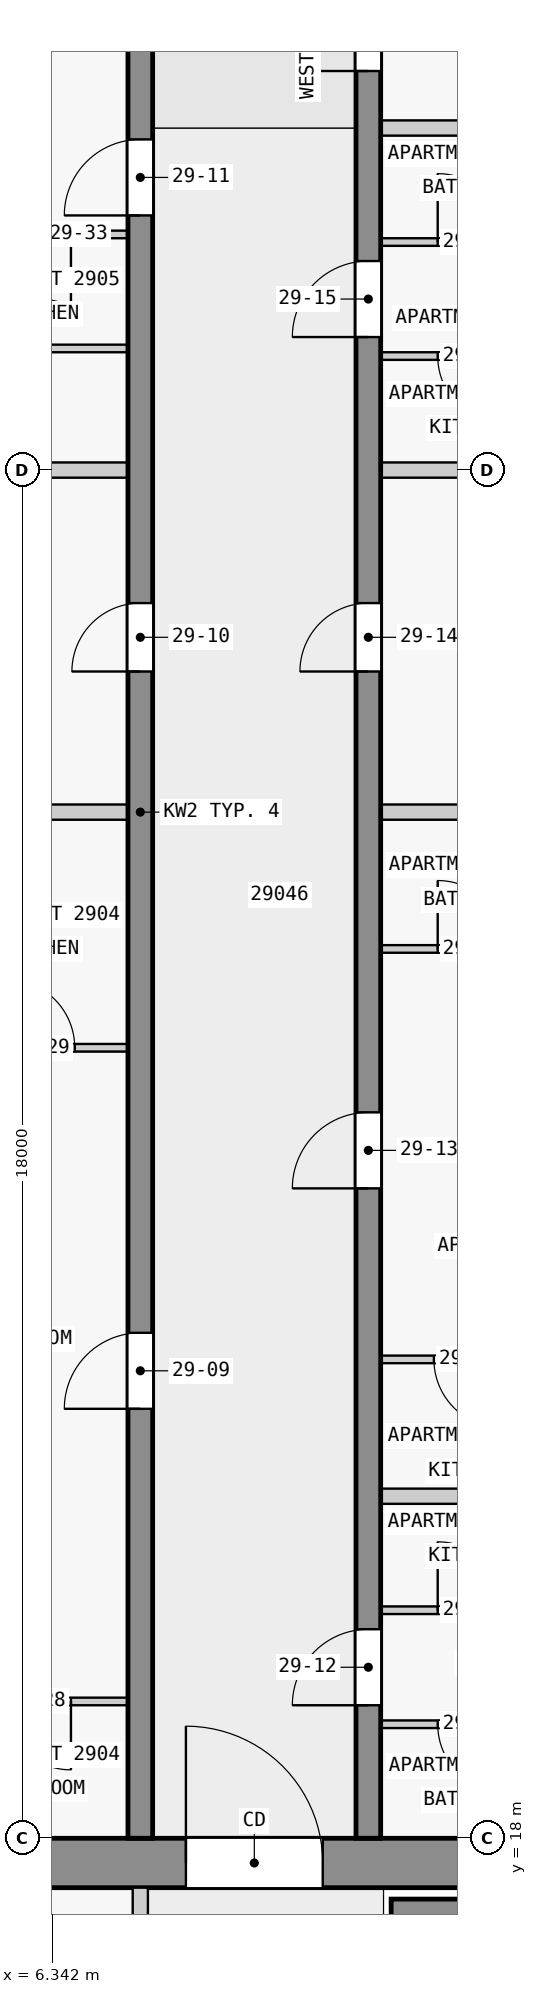
"""IFC4 building model, lengths in metres.
Left out: names, types, materials, properties, quantities, classifications, styles, units other than length and angle.
Written with IfcOpenShell. Run it as: python <this file> out.ifc"""

import sys

from ifc_helpers import new_model, si_unit, direction, frame, frame_2d, origin, place, context, subcontext, project, spatial, rectangle, extrude, element, fill, save


model = new_model("IFC4")
c1 = context("Model", 3, precision=1e-05, world=origin(), true_north=direction((0.0, 1.0)))
c2 = subcontext(c1, "Body", "Model", "MODEL_VIEW")
j1 = project(units=[si_unit("LENGTHUNIT", "METRE"), si_unit("PLANEANGLEUNIT", "RADIAN")], contexts=[c1])
p1 = place(None, origin())
s1 = spatial("IfcSite", under=j1, at=p1, CompositionType="ELEMENT")
p2 = place(p1, origin())
s2 = spatial("IfcBuilding", under=s1, at=p2, CompositionType="ELEMENT")
p3 = place(p2, frame((0.0, 0.0, 113.3)))
s3 = spatial("IfcBuildingStorey", under=s2, at=p3, CompositionType="ELEMENT", Elevation=113.3)
p4 = place(p3, frame((1.65, 17.675, 0.0), z_axis=(0.0, 0.0, 1.0), x_axis=(1.0, 0.0, 0.0)))
e1 = element("IfcWall", 1, at=p4, inside=s3, PredefinedType="SHEAR", context=c2, shape_type="SweptSolid", body=[
    extrude(rectangle(XDim=20.85, YDim=0.65, at=frame_2d((10.425, 0.0))), origin(), (0.0, 0.0, 1.0), 3.25),
])
p5 = place(p4, frame((6.45, 0.0, 0.0)))
e2 = element("IfcOpeningElement", 2, at=p5, cuts=e1, PredefinedType="OPENING", context=c2, shape_type="SweptSolid", body=[
    extrude(rectangle(XDim=1.8, YDim=2.1, at=frame_2d((0.9, 1.05))), frame((0.0, 0.335, 0.0), z_axis=(0.0, -1.0, 0.0), x_axis=(1.0, 0.0, 0.0)), (0.0, 0.0, 1.0), 0.67),
])
p6 = place(p3, frame((10.8, 17.05, 0.0), z_axis=(0.0, 0.0, 1.0), x_axis=(1.0, 0.0, 0.0)))
e3 = element("IfcWall", 3, at=p6, inside=s3, PredefinedType="SHEAR", context=c2, shape_type="SweptSolid", body=[
    extrude(rectangle(XDim=7.8, YDim=0.3, at=frame_2d((3.9, 0.0))), origin(), (0.0, 0.0, 1.0), 3.25),
])
p7 = place(p3, frame((7.5, 18.0, 0.0), z_axis=(0.0, 0.0, 1.0), x_axis=(0.0, 1.0, 0.0)))
e4 = element("IfcWall", 4, at=p7, inside=s3, PredefinedType="SHEAR", context=c2, shape_type="SweptSolid", body=[
    extrude(rectangle(XDim=27.0, YDim=0.325, at=frame_2d((13.5, 0.0))), origin(), (0.0, 0.0, 1.0), 3.25),
])
p8 = place(p7, frame((5.65, 0.0, 0.0)))
e5 = element("IfcOpeningElement", 5, at=p8, cuts=e4, PredefinedType="OPENING", context=c2, shape_type="SweptSolid", body=[
    extrude(rectangle(XDim=1.0, YDim=2.1, at=frame_2d((0.5, 1.05))), frame((0.0, 0.172, 0.0), z_axis=(0.0, -1.0, 0.0), x_axis=(1.0, 0.0, 0.0)), (0.0, 0.0, 1.0), 0.345),
])
p9 = place(p7, frame((15.35, 0.0, 0.0)))
e6 = element("IfcOpeningElement", 6, at=p9, cuts=e4, PredefinedType="OPENING", context=c2, shape_type="SweptSolid", body=[
    extrude(rectangle(XDim=0.9, YDim=2.1, at=frame_2d((0.45, 1.05))), frame((0.0, 0.172, 0.0), z_axis=(0.0, -1.0, 0.0), x_axis=(1.0, 0.0, 0.0)), (0.0, 0.0, 1.0), 0.345),
])
p10 = place(p7, frame((21.35, 0.0, 0.0)))
e7 = element("IfcOpeningElement", 7, at=p10, cuts=e4, PredefinedType="OPENING", context=c2, shape_type="SweptSolid", body=[
    extrude(rectangle(XDim=1.0, YDim=2.1, at=frame_2d((0.5, 1.05))), frame((0.0, 0.172, 0.0), z_axis=(0.0, -1.0, 0.0), x_axis=(1.0, 0.0, 0.0)), (0.0, 0.0, 1.0), 0.345),
])
p11 = place(p3, frame((10.5, 18.0, 0.0), z_axis=(0.0, 0.0, 1.0), x_axis=(0.0, 1.0, 0.0)))
e8 = element("IfcWall", 8, at=p11, inside=s3, PredefinedType="SHEAR", context=c2, shape_type="SweptSolid", body=[
    extrude(rectangle(XDim=27.0, YDim=0.325, at=frame_2d((13.5, 0.0))), origin(), (0.0, 0.0, 1.0), 3.25),
])
p12 = place(p11, frame((1.75, 0.0, 0.0)))
e9 = element("IfcOpeningElement", 9, at=p12, cuts=e8, PredefinedType="OPENING", context=c2, shape_type="SweptSolid", body=[
    extrude(rectangle(XDim=1.0, YDim=2.1, at=frame_2d((0.5, 1.05))), frame((0.0, 0.172, 0.0), z_axis=(0.0, -1.0, 0.0), x_axis=(1.0, 0.0, 0.0)), (0.0, 0.0, 1.0), 0.345),
])
p13 = place(p11, frame((8.55, 0.0, 0.0)))
e10 = element("IfcOpeningElement", 10, at=p13, cuts=e8, PredefinedType="OPENING", context=c2, shape_type="SweptSolid", body=[
    extrude(rectangle(XDim=1.0, YDim=2.1, at=frame_2d((0.5, 1.05))), frame((0.0, 0.172, 0.0), z_axis=(0.0, -1.0, 0.0), x_axis=(1.0, 0.0, 0.0)), (0.0, 0.0, 1.0), 0.345),
])
p14 = place(p11, frame((15.35, 0.0, 0.0)))
e11 = element("IfcOpeningElement", 11, at=p14, cuts=e8, PredefinedType="OPENING", context=c2, shape_type="SweptSolid", body=[
    extrude(rectangle(XDim=0.9, YDim=2.1, at=frame_2d((0.45, 1.05))), frame((0.0, 0.172, 0.0), z_axis=(0.0, -1.0, 0.0), x_axis=(1.0, 0.0, 0.0)), (0.0, 0.0, 1.0), 0.345),
])
p15 = place(p11, frame((19.75, 0.0, 0.0)))
e12 = element("IfcOpeningElement", 12, at=p15, cuts=e8, PredefinedType="OPENING", context=c2, shape_type="SweptSolid", body=[
    extrude(rectangle(XDim=1.0, YDim=2.1, at=frame_2d((0.5, 1.05))), frame((0.0, 0.172, 0.0), z_axis=(0.0, -1.0, 0.0), x_axis=(1.0, 0.0, 0.0)), (0.0, 0.0, 1.0), 0.345),
])
p16 = place(p11, frame((23.25, 0.0, 0.0)))
e13 = element("IfcOpeningElement", 13, at=p16, cuts=e8, PredefinedType="OPENING", context=c2, shape_type="SweptSolid", body=[
    extrude(rectangle(XDim=0.9, YDim=2.1, at=frame_2d((0.45, 1.05))), frame((0.0, 0.172, 0.0), z_axis=(0.0, -1.0, 0.0), x_axis=(1.0, 0.0, 0.0)), (0.0, 0.0, 1.0), 0.345),
])
p17 = place(p11, frame((25.45, 0.0, 0.0)))
e14 = element("IfcOpeningElement", 14, at=p17, cuts=e8, PredefinedType="OPENING", context=c2, shape_type="SweptSolid", body=[
    extrude(rectangle(XDim=1.0, YDim=2.1, at=frame_2d((0.5, 1.05))), frame((0.0, 0.172, 0.0), z_axis=(0.0, -1.0, 0.0), x_axis=(1.0, 0.0, 0.0)), (0.0, 0.0, 1.0), 0.345),
])
p18 = place(p3, frame((7.5, 10.1, 0.0), z_axis=(0.0, 0.0, 1.0), x_axis=(0.0, 1.0, 0.0)))
e15 = element("IfcWall", 15, at=p18, inside=s3, PredefinedType="PARTITIONING", context=c2, shape_type="SweptSolid", body=[
    extrude(rectangle(XDim=7.25, YDim=0.2, at=frame_2d((3.625, 0.0))), origin(), (0.0, 0.0, 1.0), 3.25),
])
p19 = place(p18, frame((1.5, 0.0, 0.0)))
e16 = element("IfcOpeningElement", 16, at=p19, cuts=e15, PredefinedType="OPENING", context=c2, shape_type="SweptSolid", body=[
    extrude(rectangle(XDim=0.9, YDim=2.1, at=frame_2d((0.45, 1.05))), frame((0.0, 0.11, 0.0), z_axis=(0.0, -1.0, 0.0), x_axis=(1.0, 0.0, 0.0)), (0.0, 0.0, 1.0), 0.22),
])
p20 = place(p18, frame((5.125, 0.0, 0.0)))
e17 = element("IfcOpeningElement", 17, at=p20, cuts=e15, PredefinedType="OPENING", context=c2, shape_type="SweptSolid", body=[
    extrude(rectangle(XDim=0.9, YDim=2.1, at=frame_2d((0.45, 1.05))), frame((0.0, 0.11, 0.0), z_axis=(0.0, -1.0, 0.0), x_axis=(1.0, 0.0, 0.0)), (0.0, 0.0, 1.0), 0.22),
])
p21 = place(p3, frame((13.062, 19.5, 0.0), z_axis=(0.0, 0.0, 1.0), x_axis=(-1.0, 0.0, 0.0)))
e18 = element("IfcWall", 18, at=p21, inside=s3, PredefinedType="PARTITIONING", context=c2, shape_type="SweptSolid", body=[
    extrude(rectangle(XDim=2.4, YDim=0.1, at=frame_2d((1.2, 0.0))), origin(), (0.0, 0.0, 1.0), 3.25),
])
p22 = place(p21, frame((0.75, 0.0, 0.0)))
e19 = element("IfcOpeningElement", 19, at=p22, cuts=e18, PredefinedType="OPENING", context=c2, shape_type="SweptSolid", body=[
    extrude(rectangle(XDim=0.9, YDim=2.1, at=frame_2d((0.45, 1.05))), frame((0.0, 0.06, 0.0), z_axis=(0.0, -1.0, 0.0), x_axis=(1.0, 0.0, 0.0)), (0.0, 0.0, 1.0), 0.12),
])
p23 = place(p3, frame((7.337, 19.8, 0.0), z_axis=(0.0, 0.0, 1.0), x_axis=(-1.0, 0.0, 0.0)))
e20 = element("IfcWall", 20, at=p23, inside=s3, PredefinedType="PARTITIONING", context=c2, shape_type="SweptSolid", body=[
    extrude(rectangle(XDim=2.35, YDim=0.1, at=frame_2d((1.175, 0.0))), origin(), (0.0, 0.0, 1.0), 3.25),
])
p24 = place(p23, frame((0.75, 0.0, 0.0)))
e21 = element("IfcOpeningElement", 21, at=p24, cuts=e20, PredefinedType="OPENING", context=c2, shape_type="SweptSolid", body=[
    extrude(rectangle(XDim=0.9, YDim=2.1, at=frame_2d((0.45, 1.05))), frame((0.0, 0.06, 0.0), z_axis=(0.0, -1.0, 0.0), x_axis=(1.0, 0.0, 0.0)), (0.0, 0.0, 1.0), 0.12),
])
p25 = place(p3, frame((10.663, 21.0, 0.0), z_axis=(0.0, 0.0, 1.0), x_axis=(1.0, 0.0, 0.0)))
e22 = element("IfcWall", 22, at=p25, inside=s3, PredefinedType="PARTITIONING", context=c2, shape_type="SweptSolid", body=[
    extrude(rectangle(XDim=2.35, YDim=0.1, at=frame_2d((1.175, 0.0))), origin(), (0.0, 0.0, 1.0), 3.25),
])
p26 = place(p25, frame((0.75, 0.0, 0.0)))
e23 = element("IfcOpeningElement", 23, at=p26, cuts=e22, PredefinedType="OPENING", context=c2, shape_type="SweptSolid", body=[
    extrude(rectangle(XDim=0.9, YDim=2.1, at=frame_2d((0.45, 1.05))), frame((0.0, 0.06, 0.0), z_axis=(0.0, -1.0, 0.0), x_axis=(1.0, 0.0, 0.0)), (0.0, 0.0, 1.0), 0.12),
])
p27 = place(p3, frame((12.962, 22.5, 0.0), z_axis=(0.0, 0.0, 1.0), x_axis=(-1.0, 0.0, 0.0)))
e24 = element("IfcWall", 24, at=p27, inside=s3, PredefinedType="PARTITIONING", context=c2, shape_type="SweptSolid", body=[
    extrude(rectangle(XDim=2.3, YDim=0.2, at=frame_2d((1.15, 0.0))), origin(), (0.0, 0.0, 1.0), 3.25),
])
p28 = place(p3, frame((13.012, 24.3, 0.0), z_axis=(0.0, 0.0, 1.0), x_axis=(-1.0, 0.0, 0.0)))
e25 = element("IfcWall", 25, at=p28, inside=s3, PredefinedType="PARTITIONING", context=c2, shape_type="SweptSolid", body=[
    extrude(rectangle(XDim=2.35, YDim=0.1, at=frame_2d((1.175, 0.0))), origin(), (0.0, 0.0, 1.0), 3.25),
])
p29 = place(p28, frame((0.75, 0.0, 0.0)))
e26 = element("IfcOpeningElement", 26, at=p29, cuts=e25, PredefinedType="OPENING", context=c2, shape_type="SweptSolid", body=[
    extrude(rectangle(XDim=0.9, YDim=2.1, at=frame_2d((0.45, 1.05))), frame((0.0, 0.06, 0.0), z_axis=(0.0, -1.0, 0.0), x_axis=(1.0, 0.0, 0.0)), (0.0, 0.0, 1.0), 0.12),
])
p30 = place(p3, frame((4.988, 28.4, 0.0), z_axis=(0.0, 0.0, 1.0), x_axis=(1.0, 0.0, 0.0)))
e27 = element("IfcWall", 27, at=p30, inside=s3, PredefinedType="PARTITIONING", context=c2, shape_type="SweptSolid", body=[
    extrude(rectangle(XDim=2.35, YDim=0.1, at=frame_2d((1.175, 0.0))), origin(), (0.0, 0.0, 1.0), 3.25),
])
p31 = place(p30, frame((0.75, 0.0, 0.0)))
e28 = element("IfcOpeningElement", 28, at=p31, cuts=e27, PredefinedType="OPENING", context=c2, shape_type="SweptSolid", body=[
    extrude(rectangle(XDim=0.9, YDim=2.1, at=frame_2d((0.45, 1.05))), frame((0.0, 0.06, 0.0), z_axis=(0.0, -1.0, 0.0), x_axis=(1.0, 0.0, 0.0)), (0.0, 0.0, 1.0), 0.12),
])
p32 = place(p3, frame((10.663, 29.7, 0.0), z_axis=(0.0, 0.0, 1.0), x_axis=(1.0, 0.0, 0.0)))
e29 = element("IfcWall", 29, at=p32, inside=s3, PredefinedType="PARTITIONING", context=c2, shape_type="SweptSolid", body=[
    extrude(rectangle(XDim=2.35, YDim=0.1, at=frame_2d((1.175, 0.0))), origin(), (0.0, 0.0, 1.0), 3.25),
])
p33 = place(p32, frame((0.75, 0.0, 0.0)))
e30 = element("IfcOpeningElement", 30, at=p33, cuts=e29, PredefinedType="OPENING", context=c2, shape_type="SweptSolid", body=[
    extrude(rectangle(XDim=0.9, YDim=2.1, at=frame_2d((0.45, 1.05))), frame((0.0, 0.06, 0.0), z_axis=(0.0, -1.0, 0.0), x_axis=(1.0, 0.0, 0.0)), (0.0, 0.0, 1.0), 0.12),
])
for number, where, z_axis, x_axis in (
    (31, (7.337, 31.5, 0.0), (0.0, 0.0, 1.0), (-1.0, 0.0, 0.0)),
    (32, (18.08, 31.5, 0.0), (0.0, 0.0, 1.0), (-1.0, 0.0, 0.0)),
):
    element("IfcWall", number, at=place(p3, frame(where, z_axis=z_axis, x_axis=x_axis)), inside=s3, PredefinedType="PARTITIONING", context=c2, shape_type="SweptSolid", body=[
        extrude(rectangle(XDim=7.417, YDim=0.2, at=frame_2d((3.709, 0.0))), origin(), (0.0, 0.0, 1.0), 3.25),
    ])
for number, where, z_axis, x_axis in (
    (33, (7.337, 36.0, 0.0), (0.0, 0.0, 1.0), (-1.0, 0.0, 0.0)),
    (34, (16.6, 36.0, 0.0), (0.0, 0.0, 1.0), (-1.0, 0.0, 0.0)),
):
    element("IfcWall", number, at=place(p3, frame(where, z_axis=z_axis, x_axis=x_axis)), inside=s3, PredefinedType="PARTITIONING", context=c2, shape_type="SweptSolid", body=[
        extrude(rectangle(XDim=5.938, YDim=0.2, at=frame_2d((2.969, 0.0))), origin(), (0.0, 0.0, 1.0), 3.25),
    ])
p34 = place(p3, frame((13.062, 37.5, 0.0), z_axis=(0.0, 0.0, 1.0), x_axis=(-1.0, 0.0, 0.0)))
e35 = element("IfcWall", 35, at=p34, inside=s3, PredefinedType="PARTITIONING", context=c2, shape_type="SweptSolid", body=[
    extrude(rectangle(XDim=2.4, YDim=0.1, at=frame_2d((1.2, 0.0))), origin(), (0.0, 0.0, 1.0), 3.25),
])
p35 = place(p34, frame((0.75, 0.0, 0.0)))
e36 = element("IfcOpeningElement", 36, at=p35, cuts=e35, PredefinedType="OPENING", context=c2, shape_type="SweptSolid", body=[
    extrude(rectangle(XDim=0.9, YDim=2.1, at=frame_2d((0.45, 1.05))), frame((0.0, 0.06, 0.0), z_axis=(0.0, -1.0, 0.0), x_axis=(1.0, 0.0, 0.0)), (0.0, 0.0, 1.0), 0.12),
])
p36 = place(p3, frame((7.337, 37.6, 0.0), z_axis=(0.0, 0.0, 1.0), x_axis=(-1.0, 0.0, 0.0)))
e37 = element("IfcWall", 37, at=p36, inside=s3, PredefinedType="PARTITIONING", context=c2, shape_type="SweptSolid", body=[
    extrude(rectangle(XDim=2.35, YDim=0.1, at=frame_2d((1.175, 0.0))), origin(), (0.0, 0.0, 1.0), 3.25),
])
p37 = place(p3, frame((10.663, 39.0, 0.0), z_axis=(0.0, 0.0, 1.0), x_axis=(1.0, 0.0, 0.0)))
e38 = element("IfcWall", 38, at=p37, inside=s3, PredefinedType="PARTITIONING", context=c2, shape_type="SweptSolid", body=[
    extrude(rectangle(XDim=2.4, YDim=0.1, at=frame_2d((1.2, 0.0))), origin(), (0.0, 0.0, 1.0), 3.25),
])
p38 = place(p37, frame((0.75, 0.0, 0.0)))
e39 = element("IfcOpeningElement", 39, at=p38, cuts=e38, PredefinedType="OPENING", context=c2, shape_type="SweptSolid", body=[
    extrude(rectangle(XDim=0.9, YDim=2.1, at=frame_2d((0.45, 1.05))), frame((0.0, 0.06, 0.0), z_axis=(0.0, -1.0, 0.0), x_axis=(1.0, 0.0, 0.0)), (0.0, 0.0, 1.0), 0.12),
])
p39 = place(p3, frame((7.337, 39.1, 0.0), z_axis=(0.0, 0.0, 1.0), x_axis=(-1.0, 0.0, 0.0)))
e40 = element("IfcWall", 40, at=p39, inside=s3, PredefinedType="PARTITIONING", context=c2, shape_type="SweptSolid", body=[
    extrude(rectangle(XDim=2.35, YDim=0.1, at=frame_2d((1.175, 0.0))), origin(), (0.0, 0.0, 1.0), 3.25),
])
p40 = place(p39, frame((0.75, 0.0, 0.0)))
e41 = element("IfcOpeningElement", 41, at=p40, cuts=e40, PredefinedType="OPENING", context=c2, shape_type="SweptSolid", body=[
    extrude(rectangle(XDim=0.9, YDim=2.1, at=frame_2d((0.45, 1.05))), frame((0.0, 0.06, 0.0), z_axis=(0.0, -1.0, 0.0), x_axis=(1.0, 0.0, 0.0)), (0.0, 0.0, 1.0), 0.12),
])
p41 = place(p3, frame((12.962, 40.5, 0.0), z_axis=(0.0, 0.0, 1.0), x_axis=(-1.0, 0.0, 0.0)))
e42 = element("IfcWall", 42, at=p41, inside=s3, PredefinedType="PARTITIONING", context=c2, shape_type="SweptSolid", body=[
    extrude(rectangle(XDim=2.3, YDim=0.2, at=frame_2d((1.15, 0.0))), origin(), (0.0, 0.0, 1.0), 3.25),
])
p42 = place(p5, origin())
e43 = element("IfcDoor", 43, at=p42, inside=s3, OperationType="DOUBLE_DOOR_SINGLE_SWING", PredefinedType="DOOR", context=c2, shape_type="SweptSolid", body=[
    extrude(rectangle(XDim=1.8, YDim=2.1, at=frame_2d((0.9, 1.05))), frame((0.0, 0.025, 0.0), z_axis=(0.0, -1.0, 0.0), x_axis=(1.0, 0.0, 0.0)), (0.0, 0.0, 1.0), 0.05),
])
fill(e2, e43)
p43 = place(p8, origin())
e44 = element("IfcDoor", 44, at=p43, inside=s3, OperationType="SINGLE_SWING_LEFT", PredefinedType="DOOR", context=c2, shape_type="SweptSolid", body=[
    extrude(rectangle(XDim=1.0, YDim=2.1, at=frame_2d((0.5, 1.05))), frame((0.0, 0.025, 0.0), z_axis=(0.0, -1.0, 0.0), x_axis=(1.0, 0.0, 0.0)), (0.0, 0.0, 1.0), 0.05),
])
fill(e5, e44)
p44 = place(p9, origin())
e45 = element("IfcDoor", 45, at=p44, inside=s3, OperationType="SINGLE_SWING_RIGHT", PredefinedType="DOOR", context=c2, shape_type="SweptSolid", body=[
    extrude(rectangle(XDim=0.9, YDim=2.1, at=frame_2d((0.45, 1.05))), frame((0.0, 0.025, 0.0), z_axis=(0.0, -1.0, 0.0), x_axis=(1.0, 0.0, 0.0)), (0.0, 0.0, 1.0), 0.05),
])
fill(e6, e45)
p45 = place(p10, origin())
e46 = element("IfcDoor", 46, at=p45, inside=s3, OperationType="SINGLE_SWING_RIGHT", PredefinedType="DOOR", context=c2, shape_type="SweptSolid", body=[
    extrude(rectangle(XDim=1.0, YDim=2.1, at=frame_2d((0.5, 1.05))), frame((0.0, 0.025, 0.0), z_axis=(0.0, -1.0, 0.0), x_axis=(1.0, 0.0, 0.0)), (0.0, 0.0, 1.0), 0.05),
])
fill(e7, e46)
p46 = place(p12, origin())
e47 = element("IfcDoor", 47, at=p46, inside=s3, OperationType="SINGLE_SWING_LEFT", PredefinedType="DOOR", context=c2, shape_type="SweptSolid", body=[
    extrude(rectangle(XDim=1.0, YDim=2.1, at=frame_2d((0.5, 1.05))), frame((0.0, 0.025, 0.0), z_axis=(0.0, -1.0, 0.0), x_axis=(1.0, 0.0, 0.0)), (0.0, 0.0, 1.0), 0.05),
])
fill(e9, e47)
p47 = place(p13, origin())
e48 = element("IfcDoor", 48, at=p47, inside=s3, OperationType="SINGLE_SWING_LEFT", PredefinedType="DOOR", context=c2, shape_type="SweptSolid", body=[
    extrude(rectangle(XDim=1.0, YDim=2.1, at=frame_2d((0.5, 1.05))), frame((0.0, 0.025, 0.0), z_axis=(0.0, -1.0, 0.0), x_axis=(1.0, 0.0, 0.0)), (0.0, 0.0, 1.0), 0.05),
])
fill(e10, e48)
p48 = place(p14, origin())
e49 = element("IfcDoor", 49, at=p48, inside=s3, OperationType="SINGLE_SWING_RIGHT", PredefinedType="DOOR", context=c2, shape_type="SweptSolid", body=[
    extrude(rectangle(XDim=0.9, YDim=2.1, at=frame_2d((0.45, 1.05))), frame((0.0, 0.025, 0.0), z_axis=(0.0, -1.0, 0.0), x_axis=(1.0, 0.0, 0.0)), (0.0, 0.0, 1.0), 0.05),
])
fill(e11, e49)
p49 = place(p15, origin())
e50 = element("IfcDoor", 50, at=p49, inside=s3, OperationType="SINGLE_SWING_RIGHT", PredefinedType="DOOR", context=c2, shape_type="SweptSolid", body=[
    extrude(rectangle(XDim=1.0, YDim=2.1, at=frame_2d((0.5, 1.05))), frame((0.0, 0.025, 0.0), z_axis=(0.0, -1.0, 0.0), x_axis=(1.0, 0.0, 0.0)), (0.0, 0.0, 1.0), 0.05),
])
fill(e12, e50)
p50 = place(p16, origin())
e51 = element("IfcDoor", 51, at=p50, inside=s3, OperationType="SINGLE_SWING_RIGHT", PredefinedType="DOOR", context=c2, shape_type="SweptSolid", body=[
    extrude(rectangle(XDim=0.9, YDim=2.1, at=frame_2d((0.45, 1.05))), frame((0.0, 0.025, 0.0), z_axis=(0.0, -1.0, 0.0), x_axis=(1.0, 0.0, 0.0)), (0.0, 0.0, 1.0), 0.05),
])
fill(e13, e51)
p51 = place(p24, origin())
e52 = element("IfcDoor", 52, at=p51, inside=s3, OperationType="SINGLE_SWING_RIGHT", PredefinedType="DOOR", context=c2, shape_type="SweptSolid", body=[
    extrude(rectangle(XDim=0.9, YDim=2.1, at=frame_2d((0.45, 1.05))), frame((0.0, 0.025, 0.0), z_axis=(0.0, -1.0, 0.0), x_axis=(1.0, 0.0, 0.0)), (0.0, 0.0, 1.0), 0.05),
])
fill(e21, e52)
p52 = place(p31, origin())
e53 = element("IfcDoor", 53, at=p52, inside=s3, OperationType="SINGLE_SWING_RIGHT", PredefinedType="DOOR", context=c2, shape_type="SweptSolid", body=[
    extrude(rectangle(XDim=0.9, YDim=2.1, at=frame_2d((0.45, 1.05))), frame((0.0, 0.025, 0.0), z_axis=(0.0, -1.0, 0.0), x_axis=(1.0, 0.0, 0.0)), (0.0, 0.0, 1.0), 0.05),
])
fill(e28, e53)
p53 = place(p40, origin())
e54 = element("IfcDoor", 54, at=p53, inside=s3, OperationType="SINGLE_SWING_RIGHT", PredefinedType="DOOR", context=c2, shape_type="SweptSolid", body=[
    extrude(rectangle(XDim=0.9, YDim=2.1, at=frame_2d((0.45, 1.05))), frame((0.0, 0.025, 0.0), z_axis=(0.0, -1.0, 0.0), x_axis=(1.0, 0.0, 0.0)), (0.0, 0.0, 1.0), 0.05),
])
fill(e41, e54)
p54 = place(p22, origin())
e55 = element("IfcDoor", 55, at=p54, inside=s3, OperationType="SINGLE_SWING_LEFT", PredefinedType="DOOR", context=c2, shape_type="SweptSolid", body=[
    extrude(rectangle(XDim=0.9, YDim=2.1, at=frame_2d((0.45, 1.05))), frame((0.0, 0.025, 0.0), z_axis=(0.0, -1.0, 0.0), x_axis=(1.0, 0.0, 0.0)), (0.0, 0.0, 1.0), 0.05),
])
fill(e19, e55)
p55 = place(p26, origin())
e56 = element("IfcDoor", 56, at=p55, inside=s3, OperationType="SINGLE_SWING_RIGHT", PredefinedType="DOOR", context=c2, shape_type="SweptSolid", body=[
    extrude(rectangle(XDim=0.9, YDim=2.1, at=frame_2d((0.45, 1.05))), frame((0.0, 0.025, 0.0), z_axis=(0.0, -1.0, 0.0), x_axis=(1.0, 0.0, 0.0)), (0.0, 0.0, 1.0), 0.05),
])
fill(e23, e56)
p56 = place(p29, origin())
e57 = element("IfcDoor", 57, at=p56, inside=s3, OperationType="SINGLE_SWING_RIGHT", PredefinedType="DOOR", context=c2, shape_type="SweptSolid", body=[
    extrude(rectangle(XDim=0.9, YDim=2.1, at=frame_2d((0.45, 1.05))), frame((0.0, 0.025, 0.0), z_axis=(0.0, -1.0, 0.0), x_axis=(1.0, 0.0, 0.0)), (0.0, 0.0, 1.0), 0.05),
])
fill(e26, e57)
p57 = place(p33, origin())
e58 = element("IfcDoor", 58, at=p57, inside=s3, OperationType="SINGLE_SWING_RIGHT", PredefinedType="DOOR", context=c2, shape_type="SweptSolid", body=[
    extrude(rectangle(XDim=0.9, YDim=2.1, at=frame_2d((0.45, 1.05))), frame((0.0, 0.025, 0.0), z_axis=(0.0, -1.0, 0.0), x_axis=(1.0, 0.0, 0.0)), (0.0, 0.0, 1.0), 0.05),
])
fill(e30, e58)
p58 = place(p35, origin())
e59 = element("IfcDoor", 59, at=p58, inside=s3, OperationType="SINGLE_SWING_LEFT", PredefinedType="DOOR", context=c2, shape_type="SweptSolid", body=[
    extrude(rectangle(XDim=0.9, YDim=2.1, at=frame_2d((0.45, 1.05))), frame((0.0, 0.025, 0.0), z_axis=(0.0, -1.0, 0.0), x_axis=(1.0, 0.0, 0.0)), (0.0, 0.0, 1.0), 0.05),
])
fill(e36, e59)
p59 = place(p38, origin())
e60 = element("IfcDoor", 60, at=p59, inside=s3, OperationType="SINGLE_SWING_LEFT", PredefinedType="DOOR", context=c2, shape_type="SweptSolid", body=[
    extrude(rectangle(XDim=0.9, YDim=2.1, at=frame_2d((0.45, 1.05))), frame((0.0, 0.025, 0.0), z_axis=(0.0, -1.0, 0.0), x_axis=(1.0, 0.0, 0.0)), (0.0, 0.0, 1.0), 0.05),
])
fill(e39, e60)
save(model, sys.argv[1])
